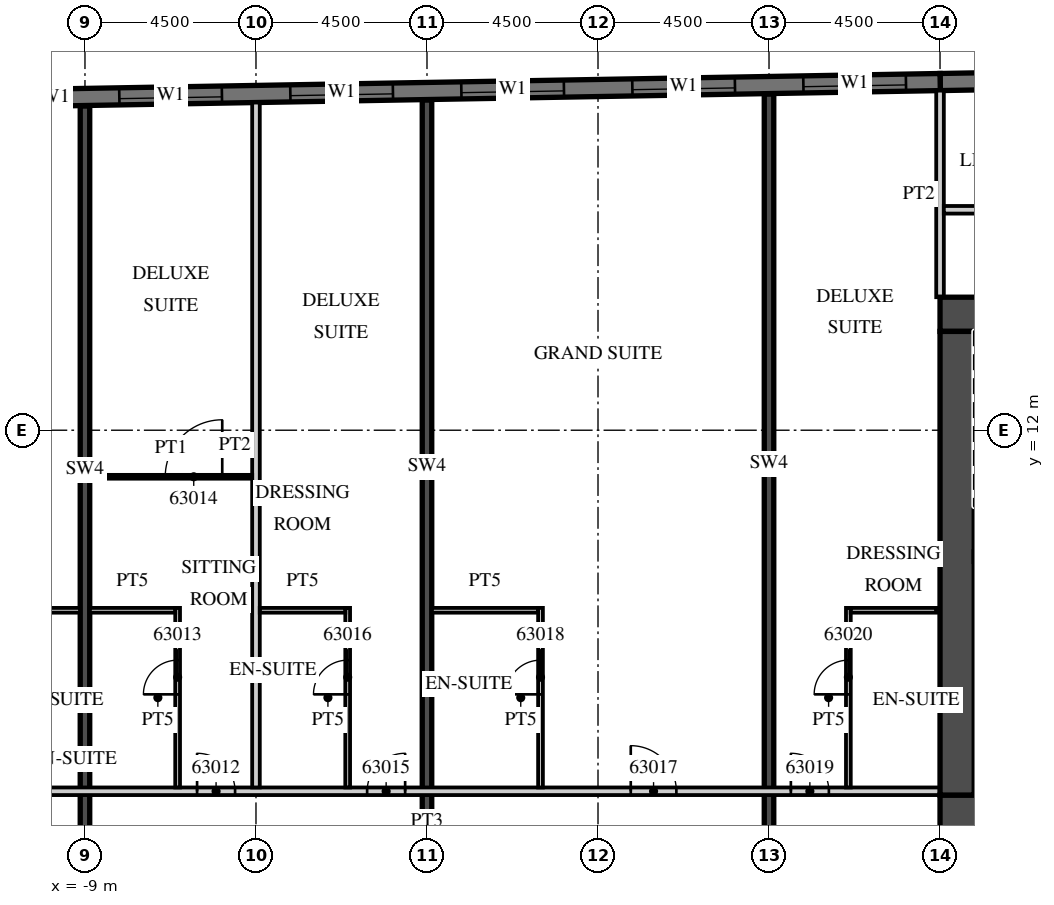
"""IFC4 building model, lengths in metres.
Left out: names, types, materials, properties, quantities, classifications, styles, units other than length and angle.
Written with IfcOpenShell. Run it as: python <this file> out.ifc"""

import sys

from ifc_helpers import new_model, si_unit, direction, frame, frame_2d, origin, place, context, subcontext, project, spatial, rectangle, extrude, element, fill, save


model = new_model("IFC4")
c1 = context("Model", 3, precision=1e-05, world=origin(), true_north=direction((0.0, 1.0)))
c2 = subcontext(c1, "Body", "Model", "MODEL_VIEW")
j1 = project(units=[si_unit("LENGTHUNIT", "METRE"), si_unit("PLANEANGLEUNIT", "RADIAN")], contexts=[c1])
p1 = place(None, origin())
s1 = spatial("IfcSite", under=j1, at=p1, CompositionType="ELEMENT")
p2 = place(p1, origin())
s2 = spatial("IfcBuilding", under=s1, at=p2, CompositionType="ELEMENT")
p3 = place(p2, frame((0.0, 0.0, 254.0)))
s3 = spatial("IfcBuildingStorey", under=s2, at=p3, CompositionType="ELEMENT", Elevation=254.0)
p4 = place(p3, frame((-9.0, 1.4, 0.0), z_axis=(0.0, 0.0, 1.0), x_axis=(0.0, 1.0, 0.0)))
e1 = element("IfcWall", 1, at=p4, inside=s3, PredefinedType="SHEAR", context=c2, shape_type="SweptSolid", body=[
    extrude(rectangle(XDim=19.132, YDim=0.25, at=frame_2d((9.566, 0.0))), origin(), (0.0, 0.0, 1.0), 3.0),
])
p5 = place(p3, frame((0.0, 1.4, 0.0), z_axis=(0.0, 0.0, 1.0), x_axis=(0.0, 1.0, 0.0)))
e2 = element("IfcWall", 2, at=p5, inside=s3, PredefinedType="SHEAR", context=c2, shape_type="SweptSolid", body=[
    extrude(rectangle(XDim=19.289, YDim=0.25, at=frame_2d((9.644, 0.0))), origin(), (0.0, 0.0, 1.0), 3.0),
])
p6 = place(p3, frame((9.0, 1.4, 0.0), z_axis=(0.0, 0.0, 1.0), x_axis=(0.0, 1.0, 0.0)))
e3 = element("IfcWall", 3, at=p6, inside=s3, PredefinedType="SHEAR", context=c2, shape_type="SweptSolid", body=[
    extrude(rectangle(XDim=19.446, YDim=0.25, at=frame_2d((9.723, 0.0))), origin(), (0.0, 0.0, 1.0), 3.0),
])
p7 = place(p3, frame((31.504, 21.476, 0.0), z_axis=(0.0, 0.0, 1.0), x_axis=(-0.999847677887, -0.017453395744, 0.0)))
e4 = element("IfcWall", 4, at=p7, inside=s3, PredefinedType="SOLIDWALL", context=c2, shape_type="SweptSolid", body=[
    extrude(rectangle(XDim=18.003, YDim=0.45, at=frame_2d((9.001, 0.0))), origin(), (0.0, 0.0, 1.0), 3.0),
])
p8 = place(p3, frame((13.504, 21.161, 0.0), z_axis=(0.0, 0.0, 1.0), x_axis=(-0.999847763257, -0.017448504532, 0.0)))
e5 = element("IfcWall", 5, at=p8, inside=s3, PredefinedType="SOLIDWALL", context=c2, shape_type="SweptSolid", body=[
    extrude(rectangle(XDim=46.859, YDim=0.45, at=frame_2d((23.43, 0.0))), origin(), (0.0, 0.0, 1.0), 3.0),
])
p9 = place(p8, frame((0.9, 0.0, 0.45)))
e6 = element("IfcOpeningElement", 6, at=p9, cuts=e5, PredefinedType="OPENING", context=c2, shape_type="SweptSolid", body=[
    extrude(rectangle(XDim=2.7, YDim=2.25, at=frame_2d((1.35, 1.125))), frame((0.0, 0.235, 0.0), z_axis=(0.0, -1.0, 0.0), x_axis=(1.0, 0.0, 0.0)), (0.0, 0.0, 1.0), 0.47),
])
p10 = place(p8, frame((5.401, 0.0, 0.45)))
e7 = element("IfcOpeningElement", 7, at=p10, cuts=e5, PredefinedType="OPENING", context=c2, shape_type="SweptSolid", body=[
    extrude(rectangle(XDim=2.7, YDim=2.25, at=frame_2d((1.35, 1.125))), frame((0.0, 0.235, 0.0), z_axis=(0.0, -1.0, 0.0), x_axis=(1.0, 0.0, 0.0)), (0.0, 0.0, 1.0), 0.47),
])
p11 = place(p8, frame((9.902, 0.0, 0.45)))
e8 = element("IfcOpeningElement", 8, at=p11, cuts=e5, PredefinedType="OPENING", context=c2, shape_type="SweptSolid", body=[
    extrude(rectangle(XDim=2.7, YDim=2.25, at=frame_2d((1.35, 1.125))), frame((0.0, 0.235, 0.0), z_axis=(0.0, -1.0, 0.0), x_axis=(1.0, 0.0, 0.0)), (0.0, 0.0, 1.0), 0.47),
])
p12 = place(p8, frame((14.402, 0.0, 0.45)))
e9 = element("IfcOpeningElement", 9, at=p12, cuts=e5, PredefinedType="OPENING", context=c2, shape_type="SweptSolid", body=[
    extrude(rectangle(XDim=2.7, YDim=2.25, at=frame_2d((1.35, 1.125))), frame((0.0, 0.235, 0.0), z_axis=(0.0, -1.0, 0.0), x_axis=(1.0, 0.0, 0.0)), (0.0, 0.0, 1.0), 0.47),
])
p13 = place(p8, frame((18.903, 0.0, 0.45)))
e10 = element("IfcOpeningElement", 10, at=p13, cuts=e5, PredefinedType="OPENING", context=c2, shape_type="SweptSolid", body=[
    extrude(rectangle(XDim=2.7, YDim=2.25, at=frame_2d((1.35, 1.125))), frame((0.0, 0.235, 0.0), z_axis=(0.0, -1.0, 0.0), x_axis=(1.0, 0.0, 0.0)), (0.0, 0.0, 1.0), 0.47),
])
p14 = place(p8, frame((23.404, 0.0, 0.45)))
e11 = element("IfcOpeningElement", 11, at=p14, cuts=e5, PredefinedType="OPENING", context=c2, shape_type="SweptSolid", body=[
    extrude(rectangle(XDim=2.7, YDim=2.25, at=frame_2d((1.35, 1.125))), frame((0.0, 0.235, 0.0), z_axis=(0.0, -1.0, 0.0), x_axis=(1.0, 0.0, 0.0)), (0.0, 0.0, 1.0), 0.47),
])
p15 = place(p8, frame((27.904, 0.0, 0.45)))
e12 = element("IfcOpeningElement", 12, at=p15, cuts=e5, PredefinedType="OPENING", context=c2, shape_type="SweptSolid", body=[
    extrude(rectangle(XDim=2.7, YDim=2.25, at=frame_2d((1.35, 1.125))), frame((0.0, 0.235, 0.0), z_axis=(0.0, -1.0, 0.0), x_axis=(1.0, 0.0, 0.0)), (0.0, 0.0, 1.0), 0.47),
])
p16 = place(p8, frame((32.405, 0.0, 0.45)))
e13 = element("IfcOpeningElement", 13, at=p16, cuts=e5, PredefinedType="OPENING", context=c2, shape_type="SweptSolid", body=[
    extrude(rectangle(XDim=2.7, YDim=2.25, at=frame_2d((1.35, 1.125))), frame((0.0, 0.235, 0.0), z_axis=(0.0, -1.0, 0.0), x_axis=(1.0, 0.0, 0.0)), (0.0, 0.0, 1.0), 0.47),
])
p17 = place(p8, frame((36.906, 0.0, 0.45)))
e14 = element("IfcOpeningElement", 14, at=p17, cuts=e5, PredefinedType="OPENING", context=c2, shape_type="SweptSolid", body=[
    extrude(rectangle(XDim=2.7, YDim=2.25, at=frame_2d((1.35, 1.125))), frame((0.0, 0.235, 0.0), z_axis=(0.0, -1.0, 0.0), x_axis=(1.0, 0.0, 0.0)), (0.0, 0.0, 1.0), 0.47),
])
p18 = place(p8, frame((41.406, 0.0, 0.45)))
e15 = element("IfcOpeningElement", 15, at=p18, cuts=e5, PredefinedType="OPENING", context=c2, shape_type="SweptSolid", body=[
    extrude(rectangle(XDim=2.7, YDim=2.25, at=frame_2d((1.35, 1.125))), frame((0.0, 0.235, 0.0), z_axis=(0.0, -1.0, 0.0), x_axis=(1.0, 0.0, 0.0)), (0.0, 0.0, 1.0), 0.47),
])
p19 = place(p3, frame((13.5, 15.5, 0.0), z_axis=(0.0, 0.0, 1.0), x_axis=(0.0, 1.0, 0.0)))
e16 = element("IfcWall", 16, at=p19, inside=s3, PredefinedType="PARTITIONING", context=c2, shape_type="SweptSolid", body=[
    extrude(rectangle(XDim=5.436, YDim=0.2, at=frame_2d((2.718, 0.0))), origin(), (0.0, 0.0, 1.0), 3.0),
])
p20 = place(p3, frame((-13.5, 2.5, 0.0), z_axis=(0.0, 0.0, 1.0), x_axis=(1.0, 0.0, 0.0)))
e17 = element("IfcWall", 17, at=p20, inside=s3, PredefinedType="PARTITIONING", context=c2, shape_type="SweptSolid", body=[
    extrude(rectangle(XDim=27.0, YDim=0.2, at=frame_2d((13.5, 0.0))), origin(), (0.0, 0.0, 1.0), 3.0),
])
p21 = place(p20, frame((0.575, 0.0, 0.0)))
e18 = element("IfcOpeningElement", 18, at=p21, cuts=e17, PredefinedType="OPENING", context=c2, shape_type="SweptSolid", body=[
    extrude(rectangle(XDim=1.0, YDim=2.1, at=frame_2d((0.5, 1.05))), frame((0.0, 0.11, 0.0), z_axis=(0.0, -1.0, 0.0), x_axis=(1.0, 0.0, 0.0)), (0.0, 0.0, 1.0), 0.22),
])
p22 = place(p20, frame((7.45, 0.0, 0.0)))
e19 = element("IfcOpeningElement", 19, at=p22, cuts=e17, PredefinedType="OPENING", context=c2, shape_type="SweptSolid", body=[
    extrude(rectangle(XDim=1.0, YDim=2.1, at=frame_2d((0.5, 1.05))), frame((0.0, 0.11, 0.0), z_axis=(0.0, -1.0, 0.0), x_axis=(1.0, 0.0, 0.0)), (0.0, 0.0, 1.0), 0.22),
])
p23 = place(p20, frame((11.925, 0.0, 0.0)))
e20 = element("IfcOpeningElement", 20, at=p23, cuts=e17, PredefinedType="OPENING", context=c2, shape_type="SweptSolid", body=[
    extrude(rectangle(XDim=1.0, YDim=2.1, at=frame_2d((0.5, 1.05))), frame((0.0, 0.11, 0.0), z_axis=(0.0, -1.0, 0.0), x_axis=(1.0, 0.0, 0.0)), (0.0, 0.0, 1.0), 0.22),
])
p24 = place(p20, frame((18.862, 0.0, 0.0)))
e21 = element("IfcOpeningElement", 21, at=p24, cuts=e17, PredefinedType="OPENING", context=c2, shape_type="SweptSolid", body=[
    extrude(rectangle(XDim=1.2, YDim=2.1, at=frame_2d((0.6, 1.05))), frame((0.0, 0.11, 0.0), z_axis=(0.0, -1.0, 0.0), x_axis=(1.0, 0.0, 0.0)), (0.0, 0.0, 1.0), 0.22),
])
p25 = place(p20, frame((23.075, 0.0, 0.0)))
e22 = element("IfcOpeningElement", 22, at=p25, cuts=e17, PredefinedType="OPENING", context=c2, shape_type="SweptSolid", body=[
    extrude(rectangle(XDim=1.0, YDim=2.1, at=frame_2d((0.5, 1.05))), frame((0.0, 0.11, 0.0), z_axis=(0.0, -1.0, 0.0), x_axis=(1.0, 0.0, 0.0)), (0.0, 0.0, 1.0), 0.22),
])
p26 = place(p3, frame((-11.375, 7.262, 0.0), z_axis=(0.0, 0.0, 1.0), x_axis=(1.0, 0.0, 0.0)))
e23 = element("IfcWall", 23, at=p26, inside=s3, PredefinedType="PARTITIONING", context=c2, shape_type="SweptSolid", body=[
    extrude(rectangle(XDim=2.25, YDim=0.125, at=frame_2d((1.125, 0.0))), origin(), (0.0, 0.0, 1.0), 3.0),
])
p27 = place(p3, frame((-4.5, 2.6, 0.0), z_axis=(0.0, 0.0, 1.0), x_axis=(0.0, 1.0, 0.0)))
e24 = element("IfcWall", 24, at=p27, inside=s3, PredefinedType="PARTITIONING", context=c2, shape_type="SweptSolid", body=[
    extrude(rectangle(XDim=18.022, YDim=0.2, at=frame_2d((9.011, 0.0))), origin(), (0.0, 0.0, 1.0), 3.0),
])
p28 = place(p3, frame((-6.562, 2.6, 0.0), z_axis=(0.0, 0.0, 1.0), x_axis=(0.0, 1.0, 0.0)))
e25 = element("IfcWall", 25, at=p28, inside=s3, PredefinedType="PARTITIONING", context=c2, shape_type="SweptSolid", body=[
    extrude(rectangle(XDim=4.725, YDim=0.125, at=frame_2d((2.362, 0.0))), origin(), (0.0, 0.0, 1.0), 3.0),
])
p29 = place(p28, frame((2.45, 0.0, 0.0)))
e26 = element("IfcOpeningElement", 26, at=p29, cuts=e25, PredefinedType="OPENING", context=c2, shape_type="SweptSolid", body=[
    extrude(rectangle(XDim=0.9, YDim=2.1, at=frame_2d((0.45, 1.05))), frame((0.0, 0.073, 0.0), z_axis=(0.0, -1.0, 0.0), x_axis=(1.0, 0.0, 0.0)), (0.0, 0.0, 1.0), 0.145),
])
p30 = place(p3, frame((-8.875, 7.262, 0.0), z_axis=(0.0, 0.0, 1.0), x_axis=(1.0, 0.0, 0.0)))
e27 = element("IfcWall", 27, at=p30, inside=s3, PredefinedType="PARTITIONING", context=c2, shape_type="SweptSolid", body=[
    extrude(rectangle(XDim=2.25, YDim=0.125, at=frame_2d((1.125, 0.0))), origin(), (0.0, 0.0, 1.0), 3.0),
])
p31 = place(p3, frame((-8.875, 10.775, 0.0), z_axis=(0.0, 0.0, 1.0), x_axis=(1.0, 0.0, 0.0)))
e28 = element("IfcWall", 28, at=p31, inside=s3, PredefinedType="PARTITIONING", context=c2, shape_type="SweptSolid", body=[
    extrude(rectangle(XDim=4.275, YDim=0.1, at=frame_2d((2.137, 0.0))), origin(), (0.0, 0.0, 1.0), 3.0),
])
p32 = place(p31, frame((1.987, 0.0, 0.0)))
e29 = element("IfcOpeningElement", 29, at=p32, cuts=e28, PredefinedType="OPENING", context=c2, shape_type="SweptSolid", body=[
    extrude(rectangle(XDim=1.5, YDim=2.1, at=frame_2d((0.75, 1.05))), frame((0.0, 0.06, 0.0), z_axis=(0.0, -1.0, 0.0), x_axis=(1.0, 0.0, 0.0)), (0.0, 0.0, 1.0), 0.12),
])
p33 = place(p3, frame((-2.087, 2.6, 0.0), z_axis=(0.0, 0.0, 1.0), x_axis=(0.0, 1.0, 0.0)))
e30 = element("IfcWall", 30, at=p33, inside=s3, PredefinedType="PARTITIONING", context=c2, shape_type="SweptSolid", body=[
    extrude(rectangle(XDim=4.725, YDim=0.125, at=frame_2d((2.362, 0.0))), origin(), (0.0, 0.0, 1.0), 3.0),
])
p34 = place(p33, frame((2.45, 0.0, 0.0)))
e31 = element("IfcOpeningElement", 31, at=p34, cuts=e30, PredefinedType="OPENING", context=c2, shape_type="SweptSolid", body=[
    extrude(rectangle(XDim=0.9, YDim=2.1, at=frame_2d((0.45, 1.05))), frame((0.0, 0.073, 0.0), z_axis=(0.0, -1.0, 0.0), x_axis=(1.0, 0.0, 0.0)), (0.0, 0.0, 1.0), 0.145),
])
p35 = place(p3, frame((-4.4, 7.262, 0.0), z_axis=(0.0, 0.0, 1.0), x_axis=(1.0, 0.0, 0.0)))
e32 = element("IfcWall", 32, at=p35, inside=s3, PredefinedType="PARTITIONING", context=c2, shape_type="SweptSolid", body=[
    extrude(rectangle(XDim=2.25, YDim=0.125, at=frame_2d((1.125, 0.0))), origin(), (0.0, 0.0, 1.0), 3.0),
])
p36 = place(p3, frame((2.987, 2.6, 0.0), z_axis=(0.0, 0.0, 1.0), x_axis=(0.0, 1.0, 0.0)))
e33 = element("IfcWall", 33, at=p36, inside=s3, PredefinedType="PARTITIONING", context=c2, shape_type="SweptSolid", body=[
    extrude(rectangle(XDim=4.725, YDim=0.125, at=frame_2d((2.362, 0.0))), origin(), (0.0, 0.0, 1.0), 3.0),
])
p37 = place(p36, frame((2.45, 0.0, 0.0)))
e34 = element("IfcOpeningElement", 34, at=p37, cuts=e33, PredefinedType="OPENING", context=c2, shape_type="SweptSolid", body=[
    extrude(rectangle(XDim=0.9, YDim=2.1, at=frame_2d((0.45, 1.05))), frame((0.0, 0.073, 0.0), z_axis=(0.0, -1.0, 0.0), x_axis=(1.0, 0.0, 0.0)), (0.0, 0.0, 1.0), 0.145),
])
p38 = place(p3, frame((0.125, 7.262, 0.0), z_axis=(0.0, 0.0, 1.0), x_axis=(1.0, 0.0, 0.0)))
e35 = element("IfcWall", 35, at=p38, inside=s3, PredefinedType="PARTITIONING", context=c2, shape_type="SweptSolid", body=[
    extrude(rectangle(XDim=2.8, YDim=0.125, at=frame_2d((1.4, 0.0))), origin(), (0.0, 0.0, 1.0), 3.0),
])
p39 = place(p3, frame((11.088, 2.6, 0.0), z_axis=(0.0, 0.0, 1.0), x_axis=(0.0, 1.0, 0.0)))
e36 = element("IfcWall", 36, at=p39, inside=s3, PredefinedType="PARTITIONING", context=c2, shape_type="SweptSolid", body=[
    extrude(rectangle(XDim=4.725, YDim=0.125, at=frame_2d((2.362, 0.0))), origin(), (0.0, 0.0, 1.0), 3.0),
])
p40 = place(p39, frame((2.45, 0.0, 0.0)))
e37 = element("IfcOpeningElement", 37, at=p40, cuts=e36, PredefinedType="OPENING", context=c2, shape_type="SweptSolid", body=[
    extrude(rectangle(XDim=0.9, YDim=2.1, at=frame_2d((0.45, 1.05))), frame((0.0, 0.073, 0.0), z_axis=(0.0, -1.0, 0.0), x_axis=(1.0, 0.0, 0.0)), (0.0, 0.0, 1.0), 0.145),
])
p41 = place(p3, frame((11.15, 7.262, 0.0), z_axis=(0.0, 0.0, 1.0), x_axis=(1.0, 0.0, 0.0)))
e38 = element("IfcWall", 38, at=p41, inside=s3, PredefinedType="PARTITIONING", context=c2, shape_type="SweptSolid", body=[
    extrude(rectangle(XDim=2.25, YDim=0.125, at=frame_2d((1.125, 0.0))), origin(), (0.0, 0.0, 1.0), 3.0),
])
p42 = place(p3, frame((13.5, 1.95, 0.0), z_axis=(0.0, 0.0, 1.0), x_axis=(1.0, 0.0, 0.0)))
e39 = element("IfcWall", 39, at=p42, inside=s3, PredefinedType="SHEAR", context=c2, shape_type="SweptSolid", body=[
    extrude(rectangle(XDim=18.0, YDim=0.9, at=frame_2d((9.0, 0.0))), origin(), (0.0, 0.0, 1.0), 3.0),
])
p43 = place(p42, frame((1.475, 0.0, 0.0)))
e40 = element("IfcOpeningElement", 40, at=p43, cuts=e39, PredefinedType="OPENING", context=c2, shape_type="SweptSolid", body=[
    extrude(rectangle(XDim=1.8, YDim=2.1, at=frame_2d((0.9, 1.05))), frame((0.0, 0.46, 0.0), z_axis=(0.0, -1.0, 0.0), x_axis=(1.0, 0.0, 0.0)), (0.0, 0.0, 1.0), 0.92),
])
p44 = place(p3, frame((13.5, 15.05, 0.0), z_axis=(0.0, 0.0, 1.0), x_axis=(1.0, 0.0, 0.0)))
e41 = element("IfcWall", 41, at=p44, inside=s3, PredefinedType="SHEAR", context=c2, shape_type="SweptSolid", body=[
    extrude(rectangle(XDim=6.8, YDim=0.9, at=frame_2d((3.4, 0.0))), origin(), (0.0, 0.0, 1.0), 3.0),
])
p45 = place(p44, frame((4.725, 0.0, 0.0)))
e42 = element("IfcOpeningElement", 42, at=p45, cuts=e41, PredefinedType="OPENING", context=c2, shape_type="SweptSolid", body=[
    extrude(rectangle(XDim=1.2, YDim=2.1, at=frame_2d((0.6, 1.05))), frame((0.0, 0.46, 0.0), z_axis=(0.0, -1.0, 0.0), x_axis=(1.0, 0.0, 0.0)), (0.0, 0.0, 1.0), 0.92),
])
p46 = place(p3, frame((13.95, 2.4, 0.0), z_axis=(0.0, 0.0, 1.0), x_axis=(0.0, 1.0, 0.0)))
e43 = element("IfcWall", 43, at=p46, inside=s3, PredefinedType="SHEAR", context=c2, shape_type="SweptSolid", body=[
    extrude(rectangle(XDim=12.2, YDim=0.9, at=frame_2d((6.1, 0.0))), origin(), (0.0, 0.0, 1.0), 3.0),
])
p47 = place(p3, frame((13.6, 17.8, 0.0), z_axis=(0.0, 0.0, 1.0), x_axis=(1.0, 0.0, 0.0)))
e44 = element("IfcWall", 44, at=p47, inside=s3, PredefinedType="PARTITIONING", context=c2, shape_type="SweptSolid", body=[
    extrude(rectangle(XDim=28.657, YDim=0.2, at=frame_2d((14.329, 0.0))), origin(), (0.0, 0.0, 1.0), 3.0),
])
p48 = place(p47, frame((16.613, 0.0, 0.0)))
e45 = element("IfcOpeningElement", 45, at=p48, cuts=e44, PredefinedType="OPENING", context=c2, shape_type="SweptSolid", body=[
    extrude(rectangle(XDim=0.9, YDim=2.1, at=frame_2d((0.45, 1.05))), frame((0.0, 0.11, 0.0), z_axis=(0.0, -1.0, 0.0), x_axis=(1.0, 0.0, 0.0)), (0.0, 0.0, 1.0), 0.22),
])
p49 = place(p47, frame((8.312, 0.0, 0.0)))
e46 = element("IfcOpeningElement", 46, at=p49, cuts=e44, PredefinedType="OPENING", context=c2, shape_type="SweptSolid", body=[
    extrude(rectangle(XDim=0.9, YDim=2.1, at=frame_2d((0.45, 1.05))), frame((0.0, 0.11, 0.0), z_axis=(0.0, -1.0, 0.0), x_axis=(1.0, 0.0, 0.0)), (0.0, 0.0, 1.0), 0.22),
])
p50 = place(p9, origin())
e47 = element("IfcWindow", 47, at=p50, inside=s3, PartitioningType="SINGLE_PANEL", PredefinedType="WINDOW", context=c2, shape_type="SweptSolid", body=[
    extrude(rectangle(XDim=2.7, YDim=2.25, at=frame_2d((1.35, 1.125))), frame((0.0, 0.09, 0.0), z_axis=(0.0, -1.0, 0.0), x_axis=(1.0, 0.0, 0.0)), (0.0, 0.0, 1.0), 0.06),
])
fill(e6, e47)
p51 = place(p10, origin())
e48 = element("IfcWindow", 48, at=p51, inside=s3, PartitioningType="SINGLE_PANEL", PredefinedType="WINDOW", context=c2, shape_type="SweptSolid", body=[
    extrude(rectangle(XDim=2.7, YDim=2.25, at=frame_2d((1.35, 1.125))), frame((0.0, 0.09, 0.0), z_axis=(0.0, -1.0, 0.0), x_axis=(1.0, 0.0, 0.0)), (0.0, 0.0, 1.0), 0.06),
])
fill(e7, e48)
p52 = place(p11, origin())
e49 = element("IfcWindow", 49, at=p52, inside=s3, PartitioningType="SINGLE_PANEL", PredefinedType="WINDOW", context=c2, shape_type="SweptSolid", body=[
    extrude(rectangle(XDim=2.7, YDim=2.25, at=frame_2d((1.35, 1.125))), frame((0.0, 0.09, 0.0), z_axis=(0.0, -1.0, 0.0), x_axis=(1.0, 0.0, 0.0)), (0.0, 0.0, 1.0), 0.06),
])
fill(e8, e49)
p53 = place(p12, origin())
e50 = element("IfcWindow", 50, at=p53, inside=s3, PartitioningType="SINGLE_PANEL", PredefinedType="WINDOW", context=c2, shape_type="SweptSolid", body=[
    extrude(rectangle(XDim=2.7, YDim=2.25, at=frame_2d((1.35, 1.125))), frame((0.0, 0.09, 0.0), z_axis=(0.0, -1.0, 0.0), x_axis=(1.0, 0.0, 0.0)), (0.0, 0.0, 1.0), 0.06),
])
fill(e9, e50)
p54 = place(p13, origin())
e51 = element("IfcWindow", 51, at=p54, inside=s3, PartitioningType="SINGLE_PANEL", PredefinedType="WINDOW", context=c2, shape_type="SweptSolid", body=[
    extrude(rectangle(XDim=2.7, YDim=2.25, at=frame_2d((1.35, 1.125))), frame((0.0, 0.09, 0.0), z_axis=(0.0, -1.0, 0.0), x_axis=(1.0, 0.0, 0.0)), (0.0, 0.0, 1.0), 0.06),
])
fill(e10, e51)
p55 = place(p22, origin())
e52 = element("IfcDoor", 52, at=p55, inside=s3, OperationType="SINGLE_SWING_LEFT", PredefinedType="DOOR", context=c2, shape_type="SweptSolid", body=[
    extrude(rectangle(XDim=1.0, YDim=2.1, at=frame_2d((0.5, 1.05))), frame((0.0, 0.025, 0.0), z_axis=(0.0, -1.0, 0.0), x_axis=(1.0, 0.0, 0.0)), (0.0, 0.0, 1.0), 0.05),
])
fill(e19, e52)
p56 = place(p29, origin())
e53 = element("IfcDoor", 53, at=p56, inside=s3, OperationType="SINGLE_SWING_LEFT", PredefinedType="DOOR", context=c2, shape_type="SweptSolid", body=[
    extrude(rectangle(XDim=0.9, YDim=2.1, at=frame_2d((0.45, 1.05))), frame((0.0, 0.025, 0.0), z_axis=(0.0, -1.0, 0.0), x_axis=(1.0, 0.0, 0.0)), (0.0, 0.0, 1.0), 0.05),
])
fill(e26, e53)
p57 = place(p32, origin())
e54 = element("IfcDoor", 54, at=p57, inside=s3, OperationType="SINGLE_SWING_RIGHT", PredefinedType="DOOR", context=c2, shape_type="SweptSolid", body=[
    extrude(rectangle(XDim=1.5, YDim=2.1, at=frame_2d((0.75, 1.05))), frame((0.0, 0.025, 0.0), z_axis=(0.0, -1.0, 0.0), x_axis=(1.0, 0.0, 0.0)), (0.0, 0.0, 1.0), 0.05),
])
fill(e29, e54)
p58 = place(p23, origin())
e55 = element("IfcDoor", 55, at=p58, inside=s3, OperationType="SINGLE_SWING_RIGHT", PredefinedType="DOOR", context=c2, shape_type="SweptSolid", body=[
    extrude(rectangle(XDim=1.0, YDim=2.1, at=frame_2d((0.5, 1.05))), frame((0.0, 0.025, 0.0), z_axis=(0.0, -1.0, 0.0), x_axis=(1.0, 0.0, 0.0)), (0.0, 0.0, 1.0), 0.05),
])
fill(e20, e55)
p59 = place(p34, origin())
e56 = element("IfcDoor", 56, at=p59, inside=s3, OperationType="SINGLE_SWING_LEFT", PredefinedType="DOOR", context=c2, shape_type="SweptSolid", body=[
    extrude(rectangle(XDim=0.9, YDim=2.1, at=frame_2d((0.45, 1.05))), frame((0.0, 0.025, 0.0), z_axis=(0.0, -1.0, 0.0), x_axis=(1.0, 0.0, 0.0)), (0.0, 0.0, 1.0), 0.05),
])
fill(e31, e56)
p60 = place(p24, origin())
e57 = element("IfcDoor", 57, at=p60, inside=s3, OperationType="SINGLE_SWING_LEFT", PredefinedType="DOOR", context=c2, shape_type="SweptSolid", body=[
    extrude(rectangle(XDim=1.2, YDim=2.1, at=frame_2d((0.6, 1.05))), frame((0.0, 0.025, 0.0), z_axis=(0.0, -1.0, 0.0), x_axis=(1.0, 0.0, 0.0)), (0.0, 0.0, 1.0), 0.05),
])
fill(e21, e57)
p61 = place(p37, origin())
e58 = element("IfcDoor", 58, at=p61, inside=s3, OperationType="SINGLE_SWING_LEFT", PredefinedType="DOOR", context=c2, shape_type="SweptSolid", body=[
    extrude(rectangle(XDim=0.9, YDim=2.1, at=frame_2d((0.45, 1.05))), frame((0.0, 0.025, 0.0), z_axis=(0.0, -1.0, 0.0), x_axis=(1.0, 0.0, 0.0)), (0.0, 0.0, 1.0), 0.05),
])
fill(e34, e58)
p62 = place(p25, origin())
e59 = element("IfcDoor", 59, at=p62, inside=s3, OperationType="SINGLE_SWING_LEFT", PredefinedType="DOOR", context=c2, shape_type="SweptSolid", body=[
    extrude(rectangle(XDim=1.0, YDim=2.1, at=frame_2d((0.5, 1.05))), frame((0.0, 0.025, 0.0), z_axis=(0.0, -1.0, 0.0), x_axis=(1.0, 0.0, 0.0)), (0.0, 0.0, 1.0), 0.05),
])
fill(e22, e59)
p63 = place(p40, origin())
e60 = element("IfcDoor", 60, at=p63, inside=s3, OperationType="SINGLE_SWING_LEFT", PredefinedType="DOOR", context=c2, shape_type="SweptSolid", body=[
    extrude(rectangle(XDim=0.9, YDim=2.1, at=frame_2d((0.45, 1.05))), frame((0.0, 0.025, 0.0), z_axis=(0.0, -1.0, 0.0), x_axis=(1.0, 0.0, 0.0)), (0.0, 0.0, 1.0), 0.05),
])
fill(e37, e60)
save(model, sys.argv[1])
